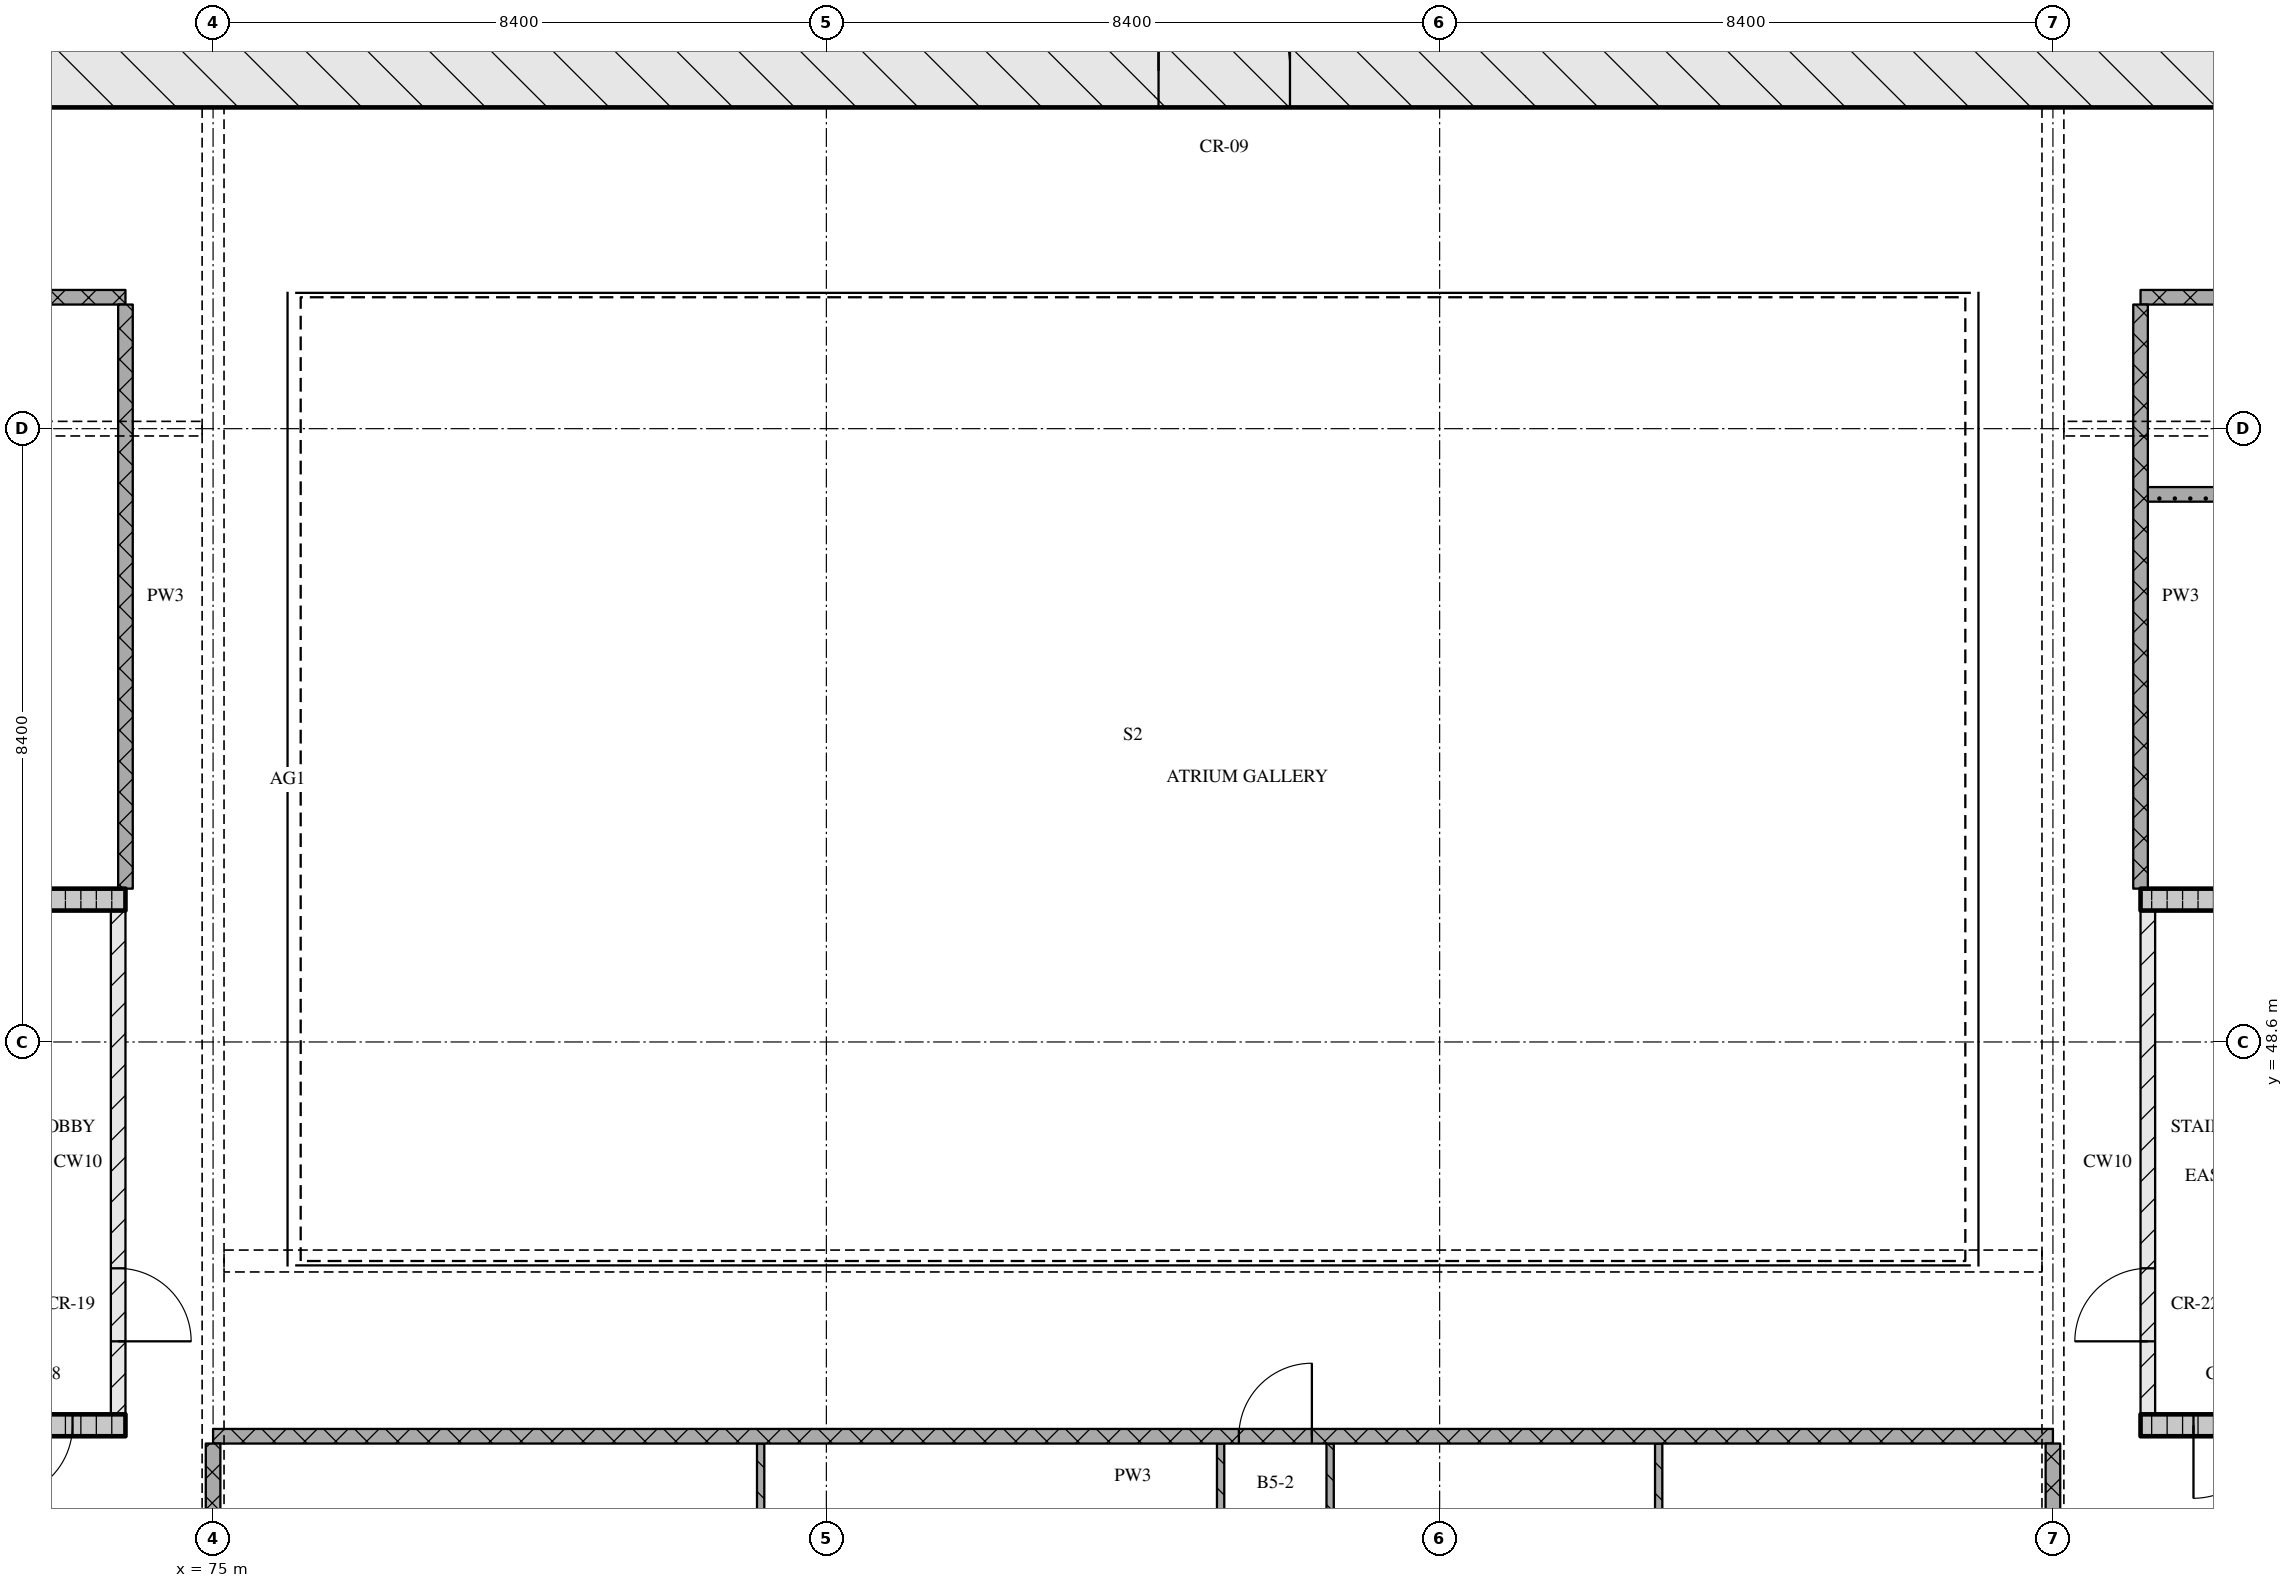
"""IFC4 building model, lengths in metres.
Left out: names, types, materials, properties, quantities, classifications, styles, units other than length and angle.
Written with IfcOpenShell. Run it as: python <this file> out.ifc"""

import sys

from ifc_helpers import new_model, si_unit, direction, frame, frame_2d, origin, place, context, subcontext, project, spatial, rectangle, extrude, element, fill, save


model = new_model("IFC4")
c1 = context("Model", 3, precision=1e-05, world=origin(), true_north=direction((0.0, 1.0)))
c2 = subcontext(c1, "Body", "Model", "MODEL_VIEW")
j1 = project(units=[si_unit("LENGTHUNIT", "METRE"), si_unit("PLANEANGLEUNIT", "RADIAN")], contexts=[c1])
p1 = place(None, origin())
s1 = spatial("IfcSite", under=j1, at=p1, CompositionType="ELEMENT")
p2 = place(p1, origin())
s2 = spatial("IfcBuilding", under=s1, at=p2, CompositionType="ELEMENT")
p3 = place(p2, frame((0.0, 0.0, 138.45)))
s3 = spatial("IfcBuildingStorey", under=s2, at=p3, CompositionType="ELEMENT", Elevation=138.45)
p4 = place(p3, frame((66.8, 61.9, 0.0), z_axis=(0.0, 0.0, 1.0), x_axis=(1.0, 0.0, 0.0)))
e1 = element("IfcWall", 1, at=p4, inside=s3, PredefinedType="SOLIDWALL", context=c2, shape_type="SweptSolid", body=[
    extrude(rectangle(XDim=41.6, YDim=1.0, at=frame_2d((20.8, 0.0))), origin(), (0.0, 0.0, 1.0), 3.3),
])
p5 = place(p4, frame((21.15, 0.0, 0.0)))
e2 = element("IfcOpeningElement", 2, at=p5, cuts=e1, PredefinedType="OPENING", context=c2, shape_type="SweptSolid", body=[
    extrude(rectangle(XDim=1.8, YDim=2.1, at=frame_2d((0.9, 1.05))), frame((0.0, 0.51, 0.0), z_axis=(0.0, -1.0, 0.0), x_axis=(1.0, 0.0, 0.0)), (0.0, 0.0, 1.0), 1.02),
])
p6 = place(p3, frame((68.2, 43.35, 0.0), z_axis=(0.0, 0.0, 1.0), x_axis=(1.0, 0.0, 0.0)))
e3 = element("IfcWall", 3, at=p6, inside=s3, PredefinedType="SOLIDWALL", context=c2, shape_type="SweptSolid", body=[
    extrude(rectangle(XDim=5.6, YDim=0.3, at=frame_2d((2.8, 0.0))), origin(), (0.0, 0.0, 1.0), 3.3),
])
p7 = place(p6, frame((3.875, 0.0, 0.0)))
e4 = element("IfcOpeningElement", 4, at=p7, cuts=e3, PredefinedType="OPENING", context=c2, shape_type="SweptSolid", body=[
    extrude(rectangle(XDim=1.0, YDim=2.1, at=frame_2d((0.5, 1.05))), frame((0.0, 0.16, 0.0), z_axis=(0.0, -1.0, 0.0), x_axis=(1.0, 0.0, 0.0)), (0.0, 0.0, 1.0), 0.32),
])
p8 = place(p3, frame((73.7, 43.5, 0.0), z_axis=(0.0, 0.0, 1.0), x_axis=(0.0, 1.0, 0.0)))
e5 = element("IfcWall", 5, at=p8, inside=s3, PredefinedType="PARTITIONING", context=c2, shape_type="SweptSolid", body=[
    extrude(rectangle(XDim=6.9, YDim=0.2, at=frame_2d((3.45, 0.0))), origin(), (0.0, 0.0, 1.0), 3.3),
])
p9 = place(p8, frame((1.0, 0.0, 0.0)))
e6 = element("IfcOpeningElement", 6, at=p9, cuts=e5, PredefinedType="OPENING", context=c2, shape_type="SweptSolid", body=[
    extrude(rectangle(XDim=1.0, YDim=2.1, at=frame_2d((0.5, 1.05))), frame((0.0, 0.11, 0.0), z_axis=(0.0, -1.0, 0.0), x_axis=(1.0, 0.0, 0.0)), (0.0, 0.0, 1.0), 0.22),
])
p10 = place(p3, frame((68.2, 50.55, 0.0), z_axis=(0.0, 0.0, 1.0), x_axis=(1.0, 0.0, 0.0)))
e7 = element("IfcWall", 7, at=p10, inside=s3, PredefinedType="SOLIDWALL", context=c2, shape_type="SweptSolid", body=[
    extrude(rectangle(XDim=5.6, YDim=0.3, at=frame_2d((2.8, 0.0))), origin(), (0.0, 0.0, 1.0), 3.3),
])
p11 = place(p3, frame((101.4, 43.35, 0.0), z_axis=(0.0, 0.0, 1.0), x_axis=(1.0, 0.0, 0.0)))
e8 = element("IfcWall", 8, at=p11, inside=s3, PredefinedType="SOLIDWALL", context=c2, shape_type="SweptSolid", body=[
    extrude(rectangle(XDim=5.6, YDim=0.3, at=frame_2d((2.8, 0.0))), origin(), (0.0, 0.0, 1.0), 3.3),
])
p12 = place(p11, frame((0.725, 0.0, 0.0)))
e9 = element("IfcOpeningElement", 9, at=p12, cuts=e8, PredefinedType="OPENING", context=c2, shape_type="SweptSolid", body=[
    extrude(rectangle(XDim=1.0, YDim=2.1, at=frame_2d((0.5, 1.05))), frame((0.0, 0.16, 0.0), z_axis=(0.0, -1.0, 0.0), x_axis=(1.0, 0.0, 0.0)), (0.0, 0.0, 1.0), 0.32),
])
p13 = place(p3, frame((101.5, 43.5, 0.0), z_axis=(0.0, 0.0, 1.0), x_axis=(0.0, 1.0, 0.0)))
e10 = element("IfcWall", 10, at=p13, inside=s3, PredefinedType="PARTITIONING", context=c2, shape_type="SweptSolid", body=[
    extrude(rectangle(XDim=6.9, YDim=0.2, at=frame_2d((3.45, 0.0))), origin(), (0.0, 0.0, 1.0), 3.3),
])
p14 = place(p13, frame((1.0, 0.0, 0.0)))
e11 = element("IfcOpeningElement", 11, at=p14, cuts=e10, PredefinedType="OPENING", context=c2, shape_type="SweptSolid", body=[
    extrude(rectangle(XDim=1.0, YDim=2.1, at=frame_2d((0.5, 1.05))), frame((0.0, 0.11, 0.0), z_axis=(0.0, -1.0, 0.0), x_axis=(1.0, 0.0, 0.0)), (0.0, 0.0, 1.0), 0.22),
])
p15 = place(p3, frame((101.4, 50.55, 0.0), z_axis=(0.0, 0.0, 1.0), x_axis=(1.0, 0.0, 0.0)))
e12 = element("IfcWall", 12, at=p15, inside=s3, PredefinedType="SOLIDWALL", context=c2, shape_type="SweptSolid", body=[
    extrude(rectangle(XDim=5.6, YDim=0.3, at=frame_2d((2.8, 0.0))), origin(), (0.0, 0.0, 1.0), 3.3),
])
p16 = place(p3, frame((100.2, 43.2, 0.0), z_axis=(0.0, 0.0, 1.0), x_axis=(-1.0, 0.0, 0.0)))
e13 = element("IfcWall", 13, at=p16, inside=s3, PredefinedType="PARTITIONING", context=c2, shape_type="SweptSolid", body=[
    extrude(rectangle(XDim=25.2, YDim=0.2, at=frame_2d((12.6, 0.0))), origin(), (0.0, 0.0, 1.0), 3.3),
])
p17 = place(p16, frame((10.15, 0.0, 0.0)))
e14 = element("IfcOpeningElement", 14, at=p17, cuts=e13, PredefinedType="OPENING", context=c2, shape_type="SweptSolid", body=[
    extrude(rectangle(XDim=1.0, YDim=2.1, at=frame_2d((0.5, 1.05))), frame((0.0, 0.11, 0.0), z_axis=(0.0, -1.0, 0.0), x_axis=(1.0, 0.0, 0.0)), (0.0, 0.0, 1.0), 0.22),
])
p18 = place(p3, frame((101.5, 56.1, 0.0), z_axis=(0.0, 0.0, 1.0), x_axis=(1.0, 0.0, 0.0)))
e15 = element("IfcWall", 15, at=p18, inside=s3, PredefinedType="PARTITIONING", context=c2, shape_type="SweptSolid", body=[
    extrude(rectangle(XDim=7.0, YDim=0.2, at=frame_2d((3.5, 0.0))), origin(), (0.0, 0.0, 1.0), 3.3),
])
p19 = place(p3, frame((73.8, 58.8, 0.0), z_axis=(0.0, 0.0, 1.0), x_axis=(-1.0, 0.0, 0.0)))
e16 = element("IfcWall", 16, at=p19, inside=s3, PredefinedType="PARTITIONING", context=c2, shape_type="SweptSolid", body=[
    extrude(rectangle(XDim=7.2, YDim=0.2, at=frame_2d((3.6, 0.0))), origin(), (0.0, 0.0, 1.0), 3.3),
])
p20 = place(p19, frame((3.0, 0.0, 0.0)))
e17 = element("IfcOpeningElement", 17, at=p20, cuts=e16, PredefinedType="OPENING", context=c2, shape_type="SweptSolid", body=[
    extrude(rectangle(XDim=1.2, YDim=2.1, at=frame_2d((0.6, 1.05))), frame((0.0, 0.11, 0.0), z_axis=(0.0, -1.0, 0.0), x_axis=(1.0, 0.0, 0.0)), (0.0, 0.0, 1.0), 0.22),
])
p21 = place(p3, frame((101.4, 58.8, 0.0), z_axis=(0.0, 0.0, 1.0), x_axis=(1.0, 0.0, 0.0)))
e18 = element("IfcWall", 18, at=p21, inside=s3, PredefinedType="PARTITIONING", context=c2, shape_type="SweptSolid", body=[
    extrude(rectangle(XDim=7.2, YDim=0.2, at=frame_2d((3.6, 0.0))), origin(), (0.0, 0.0, 1.0), 3.3),
])
p22 = place(p3, frame((73.8, 58.7, 0.0), z_axis=(0.0, 0.0, 1.0), x_axis=(0.0, -1.0, 0.0)))
e19 = element("IfcWall", 19, at=p22, inside=s3, PredefinedType="PARTITIONING", context=c2, shape_type="SweptSolid", body=[
    extrude(rectangle(XDim=8.0, YDim=0.2, at=frame_2d((4.0, 0.0))), origin(), (0.0, 0.0, 1.0), 3.3),
])
p23 = place(p3, frame((75.0, 43.1, 0.0), z_axis=(0.0, 0.0, 1.0), x_axis=(0.0, -1.0, 0.0)))
e20 = element("IfcWall", 20, at=p23, inside=s3, PredefinedType="PARTITIONING", context=c2, shape_type="SweptSolid", body=[
    extrude(rectangle(XDim=2.2, YDim=0.2, at=frame_2d((1.1, 0.0))), origin(), (0.0, 0.0, 1.0), 2.41),
])
p24 = place(p3, frame((82.5, 43.1, 0.0), z_axis=(0.0, 0.0, 1.0), x_axis=(0.0, -1.0, 0.0)))
e21 = element("IfcWall", 21, at=p24, inside=s3, PredefinedType="PARTITIONING", context=c2, shape_type="SweptSolid", body=[
    extrude(rectangle(XDim=4.35, YDim=0.1, at=frame_2d((2.175, 0.0))), origin(), (0.0, 0.0, 1.0), 3.3),
])
p25 = place(p3, frame((88.8, 38.75, 0.0), z_axis=(0.0, 0.0, 1.0), x_axis=(0.0, 1.0, 0.0)))
e22 = element("IfcWall", 22, at=p25, inside=s3, PredefinedType="PARTITIONING", context=c2, shape_type="SweptSolid", body=[
    extrude(rectangle(XDim=4.35, YDim=0.1, at=frame_2d((2.175, 0.0))), origin(), (0.0, 0.0, 1.0), 3.3),
])
p26 = place(p25, frame((1.75, 0.0, 0.0)))
e23 = element("IfcOpeningElement", 23, at=p26, cuts=e22, PredefinedType="OPENING", context=c2, shape_type="SweptSolid", body=[
    extrude(rectangle(XDim=0.9, YDim=2.1, at=frame_2d((0.45, 1.05))), frame((0.0, 0.06, 0.0), z_axis=(0.0, -1.0, 0.0), x_axis=(1.0, 0.0, 0.0)), (0.0, 0.0, 1.0), 0.12),
])
p27 = place(p3, frame((90.3, 43.1, 0.0), z_axis=(0.0, 0.0, 1.0), x_axis=(0.0, -1.0, 0.0)))
e24 = element("IfcWall", 24, at=p27, inside=s3, PredefinedType="PARTITIONING", context=c2, shape_type="SweptSolid", body=[
    extrude(rectangle(XDim=4.35, YDim=0.1, at=frame_2d((2.175, 0.0))), origin(), (0.0, 0.0, 1.0), 3.3),
])
p28 = place(p27, frame((1.6, 0.0, 0.0)))
e25 = element("IfcOpeningElement", 25, at=p28, cuts=e24, PredefinedType="OPENING", context=c2, shape_type="SweptSolid", body=[
    extrude(rectangle(XDim=0.8, YDim=2.1, at=frame_2d((0.4, 1.05))), frame((0.0, 0.06, 0.0), z_axis=(0.0, -1.0, 0.0), x_axis=(1.0, 0.0, 0.0)), (0.0, 0.0, 1.0), 0.12),
])
p29 = place(p3, frame((94.8, 43.1, 0.0), z_axis=(0.0, 0.0, 1.0), x_axis=(0.0, -1.0, 0.0)))
e26 = element("IfcWall", 26, at=p29, inside=s3, PredefinedType="PARTITIONING", context=c2, shape_type="SweptSolid", body=[
    extrude(rectangle(XDim=4.35, YDim=0.1, at=frame_2d((2.175, 0.0))), origin(), (0.0, 0.0, 1.0), 3.3),
])
p30 = place(p3, frame((100.2, 43.1, 0.0), z_axis=(0.0, 0.0, 1.0), x_axis=(0.0, -1.0, 0.0)))
e27 = element("IfcWall", 27, at=p30, inside=s3, PredefinedType="PARTITIONING", context=c2, shape_type="SweptSolid", body=[
    extrude(rectangle(XDim=2.2, YDim=0.2, at=frame_2d((1.1, 0.0))), origin(), (0.0, 0.0, 1.0), 2.41),
])
p31 = place(p3, frame((101.4, 58.7, 0.0), z_axis=(0.0, 0.0, 1.0), x_axis=(0.0, -1.0, 0.0)))
e28 = element("IfcWall", 28, at=p31, inside=s3, PredefinedType="PARTITIONING", context=c2, shape_type="SweptSolid", body=[
    extrude(rectangle(XDim=8.0, YDim=0.2, at=frame_2d((4.0, 0.0))), origin(), (0.0, 0.0, 1.0), 3.3),
])
p32 = place(p5, origin())
e29 = element("IfcDoor", 29, at=p32, inside=s3, OperationType="DOUBLE_DOOR_SINGLE_SWING", PredefinedType="DOOR", context=c2, shape_type="SweptSolid", body=[
    extrude(rectangle(XDim=1.8, YDim=2.1, at=frame_2d((0.9, 1.05))), frame((0.0, 0.025, 0.0), z_axis=(0.0, -1.0, 0.0), x_axis=(1.0, 0.0, 0.0)), (0.0, 0.0, 1.0), 0.05),
])
fill(e2, e29)
p33 = place(p7, origin())
e30 = element("IfcDoor", 30, at=p33, inside=s3, OperationType="SINGLE_SWING_RIGHT", PredefinedType="DOOR", context=c2, shape_type="SweptSolid", body=[
    extrude(rectangle(XDim=1.0, YDim=2.1, at=frame_2d((0.5, 1.05))), frame((0.0, 0.025, 0.0), z_axis=(0.0, -1.0, 0.0), x_axis=(1.0, 0.0, 0.0)), (0.0, 0.0, 1.0), 0.05),
])
fill(e4, e30)
p34 = place(p9, origin())
e31 = element("IfcDoor", 31, at=p34, inside=s3, OperationType="SINGLE_SWING_RIGHT", PredefinedType="DOOR", context=c2, shape_type="SweptSolid", body=[
    extrude(rectangle(XDim=1.0, YDim=2.1, at=frame_2d((0.5, 1.05))), frame((0.0, 0.025, 0.0), z_axis=(0.0, -1.0, 0.0), x_axis=(1.0, 0.0, 0.0)), (0.0, 0.0, 1.0), 0.05),
])
fill(e6, e31)
p35 = place(p12, origin())
e32 = element("IfcDoor", 32, at=p35, inside=s3, OperationType="SINGLE_SWING_RIGHT", PredefinedType="DOOR", context=c2, shape_type="SweptSolid", body=[
    extrude(rectangle(XDim=1.0, YDim=2.1, at=frame_2d((0.5, 1.05))), frame((0.0, 0.025, 0.0), z_axis=(0.0, -1.0, 0.0), x_axis=(1.0, 0.0, 0.0)), (0.0, 0.0, 1.0), 0.05),
])
fill(e9, e32)
p36 = place(p14, origin())
e33 = element("IfcDoor", 33, at=p36, inside=s3, OperationType="SINGLE_SWING_LEFT", PredefinedType="DOOR", context=c2, shape_type="SweptSolid", body=[
    extrude(rectangle(XDim=1.0, YDim=2.1, at=frame_2d((0.5, 1.05))), frame((0.0, 0.025, 0.0), z_axis=(0.0, -1.0, 0.0), x_axis=(1.0, 0.0, 0.0)), (0.0, 0.0, 1.0), 0.05),
])
fill(e11, e33)
p37 = place(p17, origin())
e34 = element("IfcDoor", 34, at=p37, inside=s3, OperationType="SINGLE_SWING_RIGHT", PredefinedType="DOOR", context=c2, shape_type="SweptSolid", body=[
    extrude(rectangle(XDim=1.0, YDim=2.1, at=frame_2d((0.5, 1.05))), frame((0.0, 0.025, 0.0), z_axis=(0.0, -1.0, 0.0), x_axis=(1.0, 0.0, 0.0)), (0.0, 0.0, 1.0), 0.05),
])
fill(e14, e34)
save(model, sys.argv[1])
